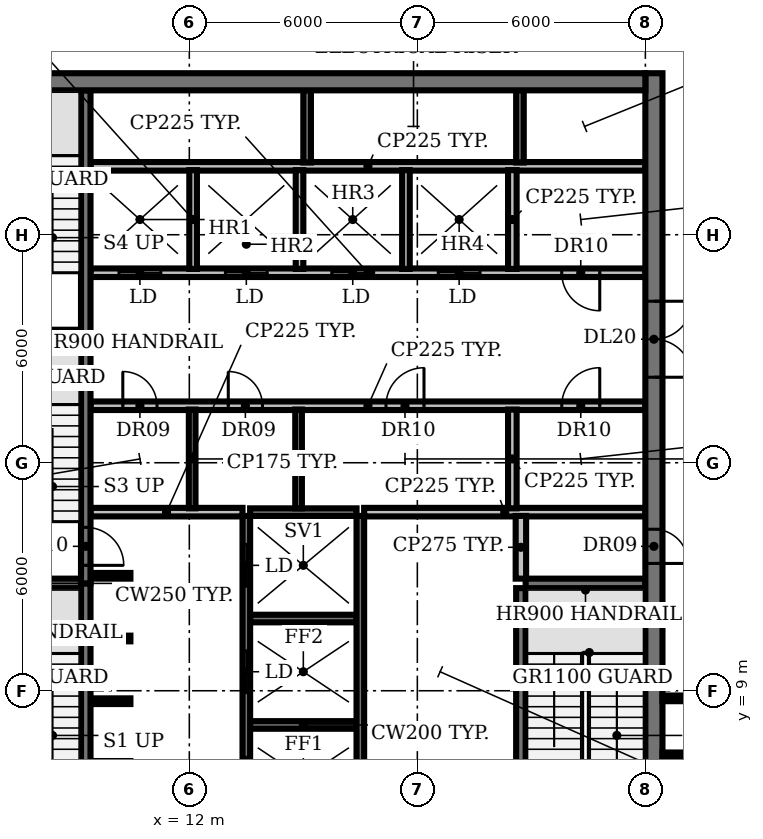
"""IFC4 building model, lengths in metres.
Left out: names, types, materials, properties, quantities, classifications, styles, units other than length and angle.
Written with IfcOpenShell. Run it as: python <this file> out.ifc"""

import sys

from ifc_helpers import new_model, si_unit, direction, frame, frame_2d, origin, place, context, subcontext, project, spatial, rectangle, extrude, element, fill, save


model = new_model("IFC4")
c1 = context("Model", 3, precision=1e-05, world=origin(), true_north=direction((0.0, 1.0)))
c2 = subcontext(c1, "Body", "Model", "MODEL_VIEW")
j1 = project(units=[si_unit("LENGTHUNIT", "METRE"), si_unit("PLANEANGLEUNIT", "RADIAN")], contexts=[c1])
p1 = place(None, origin())
s1 = spatial("IfcSite", under=j1, at=p1, CompositionType="ELEMENT")
p2 = place(p1, origin())
s2 = spatial("IfcBuilding", under=s1, at=p2, CompositionType="ELEMENT")
p3 = place(p2, frame((0.0, 0.0, 226.4)))
s3 = spatial("IfcBuildingStorey", under=s2, at=p3, CompositionType="ELEMENT", Elevation=226.4)
p4 = place(p3, frame((13.6, 8.1, 0.0), z_axis=(0.0, 0.0, 1.0), x_axis=(1.0, 0.0, 0.0)))
e1 = element("IfcWall", 1, at=p4, inside=s3, PredefinedType="SHEAR", context=c2, shape_type="SweptSolid", body=[
    extrude(rectangle(XDim=2.8, YDim=0.2, at=frame_2d((1.4, 0.0))), origin(), (0.0, 0.0, 1.0), 3.85),
])
for number, where, z_axis, x_axis in (
    (2, (9.4, 8.725, 0.0), (0.0, 0.0, 1.0), (1.0, 0.0, 0.0)),
    (3, (9.4, 10.375, 0.0), (0.0, 0.0, 1.0), (1.0, 0.0, 0.0)),
):
    element("IfcWall", number, at=place(p3, frame(where, z_axis=z_axis, x_axis=x_axis)), inside=s3, PredefinedType="SHEAR", context=c2, shape_type="SweptSolid", body=[
        extrude(rectangle(XDim=1.05, YDim=0.15, at=frame_2d((0.525, 0.0))), origin(), (0.0, 0.0, 1.0), 3.85),
    ])
p5 = place(p3, frame((13.6, 10.9, 0.0), z_axis=(0.0, 0.0, 1.0), x_axis=(1.0, 0.0, 0.0)))
e4 = element("IfcWall", 4, at=p5, inside=s3, PredefinedType="SHEAR", context=c2, shape_type="SweptSolid", body=[
    extrude(rectangle(XDim=2.8, YDim=0.2, at=frame_2d((1.4, 0.0))), origin(), (0.0, 0.0, 1.0), 3.85),
])
for number, where, z_axis, x_axis in (
    (5, (6.0, 11.825, 0.0), (0.0, 0.0, 1.0), (1.0, 0.0, 0.0)),
    (6, (20.85, 11.825, 0.0), (0.0, 0.0, 1.0), (1.0, 0.0, 0.0)),
):
    element("IfcWall", number, at=place(p3, frame(where, z_axis=z_axis, x_axis=x_axis)), inside=s3, PredefinedType="SHEAR", context=c2, shape_type="SweptSolid", body=[
        extrude(rectangle(XDim=3.15, YDim=0.25, at=frame_2d((1.575, 0.0))), origin(), (0.0, 0.0, 1.0), 3.85),
    ])
p6 = place(p3, frame((9.4, 12.025, 0.0), z_axis=(0.0, 0.0, 1.0), x_axis=(1.0, 0.0, 0.0)))
e7 = element("IfcWall", 7, at=p6, inside=s3, PredefinedType="SHEAR", context=c2, shape_type="SweptSolid", body=[
    extrude(rectangle(XDim=1.05, YDim=0.15, at=frame_2d((0.525, 0.0))), origin(), (0.0, 0.0, 1.0), 3.85),
])
p7 = place(p3, frame((9.4, 13.7, 0.0), z_axis=(0.0, 0.0, 1.0), x_axis=(1.0, 0.0, 0.0)))
e8 = element("IfcWall", 8, at=p7, inside=s3, PredefinedType="PARTITIONING", context=c2, shape_type="SweptSolid", body=[
    extrude(rectangle(XDim=4.0, YDim=0.225, at=frame_2d((2.0, 0.0))), origin(), (0.0, 0.0, 1.0), 3.85),
])
p8 = place(p3, frame((13.6, 13.7, 0.0), z_axis=(0.0, 0.0, 1.0), x_axis=(1.0, 0.0, 0.0)))
e9 = element("IfcWall", 9, at=p8, inside=s3, PredefinedType="SHEAR", context=c2, shape_type="SweptSolid", body=[
    extrude(rectangle(XDim=2.8, YDim=0.2, at=frame_2d((1.4, 0.0))), origin(), (0.0, 0.0, 1.0), 3.85),
])
p9 = place(p3, frame((16.6, 13.7, 0.0), z_axis=(0.0, 0.0, 1.0), x_axis=(1.0, 0.0, 0.0)))
e10 = element("IfcWall", 10, at=p9, inside=s3, PredefinedType="PARTITIONING", context=c2, shape_type="SweptSolid", body=[
    extrude(rectangle(XDim=7.4, YDim=0.225, at=frame_2d((3.7, 0.0))), origin(), (0.0, 0.0, 1.0), 3.85),
])
p10 = place(p3, frame((9.4, 16.5, 0.0), z_axis=(0.0, 0.0, 1.0), x_axis=(1.0, 0.0, 0.0)))
e11 = element("IfcWall", 11, at=p10, inside=s3, PredefinedType="PARTITIONING", context=c2, shape_type="SweptSolid", body=[
    extrude(rectangle(XDim=14.6, YDim=0.225, at=frame_2d((7.3, 0.0))), origin(), (0.0, 0.0, 1.0), 3.85),
])
p11 = place(p10, frame((0.85, 0.0, 0.0)))
e12 = element("IfcOpeningElement", 12, at=p11, cuts=e11, PredefinedType="OPENING", context=c2, shape_type="SweptSolid", body=[
    extrude(rectangle(XDim=0.9, YDim=2.1, at=frame_2d((0.45, 1.05))), frame((0.0, 0.123, 0.0), z_axis=(0.0, -1.0, 0.0), x_axis=(1.0, 0.0, 0.0)), (0.0, 0.0, 1.0), 0.245),
])
p12 = place(p10, frame((3.625, 0.0, 0.0)))
e13 = element("IfcOpeningElement", 13, at=p12, cuts=e11, PredefinedType="OPENING", context=c2, shape_type="SweptSolid", body=[
    extrude(rectangle(XDim=0.9, YDim=2.1, at=frame_2d((0.45, 1.05))), frame((0.0, 0.123, 0.0), z_axis=(0.0, -1.0, 0.0), x_axis=(1.0, 0.0, 0.0)), (0.0, 0.0, 1.0), 0.245),
])
p13 = place(p10, frame((7.775, 0.0, 0.0)))
e14 = element("IfcOpeningElement", 14, at=p13, cuts=e11, PredefinedType="OPENING", context=c2, shape_type="SweptSolid", body=[
    extrude(rectangle(XDim=1.0, YDim=2.1, at=frame_2d((0.5, 1.05))), frame((0.0, 0.123, 0.0), z_axis=(0.0, -1.0, 0.0), x_axis=(1.0, 0.0, 0.0)), (0.0, 0.0, 1.0), 0.245),
])
p14 = place(p10, frame((12.4, 0.0, 0.0)))
e15 = element("IfcOpeningElement", 15, at=p14, cuts=e11, PredefinedType="OPENING", context=c2, shape_type="SweptSolid", body=[
    extrude(rectangle(XDim=1.0, YDim=2.1, at=frame_2d((0.5, 1.05))), frame((0.0, 0.123, 0.0), z_axis=(0.0, -1.0, 0.0), x_axis=(1.0, 0.0, 0.0)), (0.0, 0.0, 1.0), 0.245),
])
p15 = place(p3, frame((6.0, 18.375, 0.0), z_axis=(0.0, 0.0, 1.0), x_axis=(1.0, 0.0, 0.0)))
e16 = element("IfcWall", 16, at=p15, inside=s3, PredefinedType="SHEAR", context=c2, shape_type="SweptSolid", body=[
    extrude(rectangle(XDim=3.15, YDim=0.25, at=frame_2d((1.575, 0.0))), origin(), (0.0, 0.0, 1.0), 3.85),
])
p16 = place(p3, frame((24.0, 20.0, 0.0), z_axis=(0.0, 0.0, 1.0), x_axis=(-1.0, 0.0, 0.0)))
e17 = element("IfcWall", 17, at=p16, inside=s3, PredefinedType="PARTITIONING", context=c2, shape_type="SweptSolid", body=[
    extrude(rectangle(XDim=14.6, YDim=0.225, at=frame_2d((7.3, 0.0))), origin(), (0.0, 0.0, 1.0), 3.85),
])
p17 = place(p16, frame((12.75, 0.0, 0.0)))
e18 = element("IfcOpeningElement", 18, at=p17, cuts=e17, PredefinedType="OPENING", context=c2, shape_type="SweptSolid", body=[
    extrude(rectangle(XDim=1.1, YDim=2.1, at=frame_2d((0.55, 1.05))), frame((0.0, 0.123, 0.0), z_axis=(0.0, -1.0, 0.0), x_axis=(1.0, 0.0, 0.0)), (0.0, 0.0, 1.0), 0.245),
])
p18 = place(p16, frame((9.95, 0.0, 0.0)))
e19 = element("IfcOpeningElement", 19, at=p18, cuts=e17, PredefinedType="OPENING", context=c2, shape_type="SweptSolid", body=[
    extrude(rectangle(XDim=1.1, YDim=2.1, at=frame_2d((0.55, 1.05))), frame((0.0, 0.123, 0.0), z_axis=(0.0, -1.0, 0.0), x_axis=(1.0, 0.0, 0.0)), (0.0, 0.0, 1.0), 0.245),
])
p19 = place(p16, frame((7.15, 0.0, 0.0)))
e20 = element("IfcOpeningElement", 20, at=p19, cuts=e17, PredefinedType="OPENING", context=c2, shape_type="SweptSolid", body=[
    extrude(rectangle(XDim=1.1, YDim=2.1, at=frame_2d((0.55, 1.05))), frame((0.0, 0.123, 0.0), z_axis=(0.0, -1.0, 0.0), x_axis=(1.0, 0.0, 0.0)), (0.0, 0.0, 1.0), 0.245),
])
p20 = place(p16, frame((4.35, 0.0, 0.0)))
e21 = element("IfcOpeningElement", 21, at=p20, cuts=e17, PredefinedType="OPENING", context=c2, shape_type="SweptSolid", body=[
    extrude(rectangle(XDim=1.1, YDim=2.1, at=frame_2d((0.55, 1.05))), frame((0.0, 0.123, 0.0), z_axis=(0.0, -1.0, 0.0), x_axis=(1.0, 0.0, 0.0)), (0.0, 0.0, 1.0), 0.245),
])
p21 = place(p16, frame((1.2, 0.0, 0.0)))
e22 = element("IfcOpeningElement", 22, at=p21, cuts=e17, PredefinedType="OPENING", context=c2, shape_type="SweptSolid", body=[
    extrude(rectangle(XDim=1.0, YDim=2.1, at=frame_2d((0.5, 1.05))), frame((0.0, 0.123, 0.0), z_axis=(0.0, -1.0, 0.0), x_axis=(1.0, 0.0, 0.0)), (0.0, 0.0, 1.0), 0.245),
])
p22 = place(p3, frame((9.4, 22.8, 0.0), z_axis=(0.0, 0.0, 1.0), x_axis=(1.0, 0.0, 0.0)))
e23 = element("IfcWall", 23, at=p22, inside=s3, PredefinedType="PARTITIONING", context=c2, shape_type="SweptSolid", body=[
    extrude(rectangle(XDim=14.6, YDim=0.225, at=frame_2d((7.3, 0.0))), origin(), (0.0, 0.0, 1.0), 3.85),
])
p23 = place(p3, frame((9.275, 11.825, 0.0), z_axis=(0.0, 0.0, 1.0), x_axis=(0.0, -1.0, 0.0)))
e24 = element("IfcWall", 24, at=p23, inside=s3, PredefinedType="SHEAR", context=c2, shape_type="SweptSolid", body=[
    extrude(rectangle(XDim=6.425, YDim=0.25, at=frame_2d((3.212, 0.0))), origin(), (0.0, 0.0, 1.0), 3.85),
])
p24 = place(p23, frame((5.075, 0.0, 0.0)))
e25 = element("IfcOpeningElement", 25, at=p24, cuts=e24, PredefinedType="OPENING", context=c2, shape_type="SweptSolid", body=[
    extrude(rectangle(XDim=1.0, YDim=2.1, at=frame_2d((0.5, 1.05))), frame((0.0, 0.135, 0.0), z_axis=(0.0, -1.0, 0.0), x_axis=(1.0, 0.0, 0.0)), (0.0, 0.0, 1.0), 0.27),
])
p25 = place(p3, frame((9.275, 18.375, 0.0), z_axis=(0.0, 0.0, 1.0), x_axis=(0.0, -1.0, 0.0)))
e26 = element("IfcWall", 26, at=p25, inside=s3, PredefinedType="SHEAR", context=c2, shape_type="SweptSolid", body=[
    extrude(rectangle(XDim=6.55, YDim=0.25, at=frame_2d((3.275, 0.0))), origin(), (0.0, 0.0, 1.0), 3.85),
])
p26 = place(p25, frame((5.075, 0.0, 0.0)))
e27 = element("IfcOpeningElement", 27, at=p26, cuts=e26, PredefinedType="OPENING", context=c2, shape_type="SweptSolid", body=[
    extrude(rectangle(XDim=1.0, YDim=2.1, at=frame_2d((0.5, 1.05))), frame((0.0, 0.135, 0.0), z_axis=(0.0, -1.0, 0.0), x_axis=(1.0, 0.0, 0.0)), (0.0, 0.0, 1.0), 0.27),
])
p27 = place(p3, frame((9.275, 18.375, 0.0), z_axis=(0.0, 0.0, 1.0), x_axis=(0.0, 1.0, 0.0)))
e28 = element("IfcWall", 28, at=p27, inside=s3, PredefinedType="SHEAR", context=c2, shape_type="SweptSolid", body=[
    extrude(rectangle(XDim=6.425, YDim=0.25, at=frame_2d((3.212, 0.0))), origin(), (0.0, 0.0, 1.0), 3.85),
])
p28 = place(p3, frame((12.075, 13.8, 0.0), z_axis=(0.0, 0.0, 1.0), x_axis=(0.0, 1.0, 0.0)))
e29 = element("IfcWall", 29, at=p28, inside=s3, PredefinedType="PARTITIONING", context=c2, shape_type="SweptSolid", body=[
    extrude(rectangle(XDim=2.6, YDim=0.175, at=frame_2d((1.3, 0.0))), origin(), (0.0, 0.0, 1.0), 3.85),
])
p29 = place(p3, frame((12.1, 20.1, 0.0), z_axis=(0.0, 0.0, 1.0), x_axis=(0.0, 1.0, 0.0)))
e30 = element("IfcWall", 30, at=p29, inside=s3, PredefinedType="SOLIDWALL", context=c2, shape_type="SweptSolid", body=[
    extrude(rectangle(XDim=2.6, YDim=0.2, at=frame_2d((1.3, 0.0))), origin(), (0.0, 0.0, 1.0), 3.85),
])
p30 = place(p3, frame((13.5, 5.4, 0.0), z_axis=(0.0, 0.0, 1.0), x_axis=(0.0, 1.0, 0.0)))
e31 = element("IfcWall", 31, at=p30, inside=s3, PredefinedType="SHEAR", context=c2, shape_type="SweptSolid", body=[
    extrude(rectangle(XDim=8.2, YDim=0.2, at=frame_2d((4.1, 0.0))), origin(), (0.0, 0.0, 1.0), 3.85),
])
p31 = place(p30, frame((0.75, 0.0, 0.0)))
e32 = element("IfcOpeningElement", 32, at=p31, cuts=e31, PredefinedType="OPENING", context=c2, shape_type="SweptSolid", body=[
    extrude(rectangle(XDim=1.1, YDim=2.1, at=frame_2d((0.55, 1.05))), frame((0.0, 0.11, 0.0), z_axis=(0.0, -1.0, 0.0), x_axis=(1.0, 0.0, 0.0)), (0.0, 0.0, 1.0), 0.22),
])
p32 = place(p30, frame((3.55, 0.0, 0.0)))
e33 = element("IfcOpeningElement", 33, at=p32, cuts=e31, PredefinedType="OPENING", context=c2, shape_type="SweptSolid", body=[
    extrude(rectangle(XDim=1.1, YDim=2.1, at=frame_2d((0.55, 1.05))), frame((0.0, 0.11, 0.0), z_axis=(0.0, -1.0, 0.0), x_axis=(1.0, 0.0, 0.0)), (0.0, 0.0, 1.0), 0.22),
])
p33 = place(p30, frame((6.35, 0.0, 0.0)))
e34 = element("IfcOpeningElement", 34, at=p33, cuts=e31, PredefinedType="OPENING", context=c2, shape_type="SweptSolid", body=[
    extrude(rectangle(XDim=1.1, YDim=2.1, at=frame_2d((0.55, 1.05))), frame((0.0, 0.11, 0.0), z_axis=(0.0, -1.0, 0.0), x_axis=(1.0, 0.0, 0.0)), (0.0, 0.0, 1.0), 0.22),
])
p34 = place(p3, frame((14.875, 13.8, 0.0), z_axis=(0.0, 0.0, 1.0), x_axis=(0.0, 1.0, 0.0)))
e35 = element("IfcWall", 35, at=p34, inside=s3, PredefinedType="PARTITIONING", context=c2, shape_type="SweptSolid", body=[
    extrude(rectangle(XDim=2.6, YDim=0.175, at=frame_2d((1.3, 0.0))), origin(), (0.0, 0.0, 1.0), 3.85),
])
p35 = place(p3, frame((14.9, 20.1, 0.0), z_axis=(0.0, 0.0, 1.0), x_axis=(0.0, 1.0, 0.0)))
e36 = element("IfcWall", 36, at=p35, inside=s3, PredefinedType="SOLIDWALL", context=c2, shape_type="SweptSolid", body=[
    extrude(rectangle(XDim=2.6, YDim=0.2, at=frame_2d((1.3, 0.0))), origin(), (0.0, 0.0, 1.0), 3.85),
])
p36 = place(p3, frame((15.1, 22.9, 0.0), z_axis=(0.0, 0.0, 1.0), x_axis=(0.0, 1.0, 0.0)))
e37 = element("IfcWall", 37, at=p36, inside=s3, PredefinedType="SHEAR", context=c2, shape_type="SweptSolid", body=[
    extrude(rectangle(XDim=1.9, YDim=0.2, at=frame_2d((0.95, 0.0))), origin(), (0.0, 0.0, 1.0), 3.85),
])
p37 = place(p3, frame((16.5, 5.4, 0.0), z_axis=(0.0, 0.0, 1.0), x_axis=(0.0, 1.0, 0.0)))
e38 = element("IfcWall", 38, at=p37, inside=s3, PredefinedType="SHEAR", context=c2, shape_type="SweptSolid", body=[
    extrude(rectangle(XDim=8.2, YDim=0.2, at=frame_2d((4.1, 0.0))), origin(), (0.0, 0.0, 1.0), 3.85),
])
p38 = place(p3, frame((17.7, 20.1, 0.0), z_axis=(0.0, 0.0, 1.0), x_axis=(0.0, 1.0, 0.0)))
e39 = element("IfcWall", 39, at=p38, inside=s3, PredefinedType="SOLIDWALL", context=c2, shape_type="SweptSolid", body=[
    extrude(rectangle(XDim=2.6, YDim=0.2, at=frame_2d((1.3, 0.0))), origin(), (0.0, 0.0, 1.0), 3.85),
])
for number, where, z_axis, x_axis in (
    (40, (20.5, 13.8, 0.0), (0.0, 0.0, 1.0), (0.0, 1.0, 0.0)),
    (41, (20.5, 20.1, 0.0), (0.0, 0.0, 1.0), (0.0, 1.0, 0.0)),
):
    element("IfcWall", number, at=place(p3, frame(where, z_axis=z_axis, x_axis=x_axis)), inside=s3, PredefinedType="PARTITIONING", context=c2, shape_type="SweptSolid", body=[
        extrude(rectangle(XDim=2.6, YDim=0.225, at=frame_2d((1.3, 0.0))), origin(), (0.0, 0.0, 1.0), 3.85),
    ])
p39 = place(p3, frame((20.7, 22.9, 0.0), z_axis=(0.0, 0.0, 1.0), x_axis=(0.0, 1.0, 0.0)))
e42 = element("IfcWall", 42, at=p39, inside=s3, PredefinedType="SHEAR", context=c2, shape_type="SweptSolid", body=[
    extrude(rectangle(XDim=1.9, YDim=0.2, at=frame_2d((0.95, 0.0))), origin(), (0.0, 0.0, 1.0), 3.85),
])
p40 = place(p3, frame((20.725, 5.4, 0.0), z_axis=(0.0, 0.0, 1.0), x_axis=(0.0, 1.0, 0.0)))
e43 = element("IfcWall", 43, at=p40, inside=s3, PredefinedType="SHEAR", context=c2, shape_type="SweptSolid", body=[
    extrude(rectangle(XDim=6.3, YDim=0.25, at=frame_2d((3.15, 0.0))), origin(), (0.0, 0.0, 1.0), 3.85),
])
p41 = place(p3, frame((20.725, 11.95, 0.0), z_axis=(0.0, 0.0, 1.0), x_axis=(0.0, 1.0, 0.0)))
e44 = element("IfcWall", 44, at=p41, inside=s3, PredefinedType="PARTITIONING", context=c2, shape_type="SweptSolid", body=[
    extrude(rectangle(XDim=1.65, YDim=0.275, at=frame_2d((0.825, 0.0))), origin(), (0.0, 0.0, 1.0), 3.85),
])
p42 = place(p3, frame((24.225, 25.25, 0.0), z_axis=(0.0, 0.0, 1.0), x_axis=(0.0, -1.0, 0.0)))
e45 = element("IfcWall", 45, at=p42, inside=s3, PredefinedType="SHEAR", context=c2, shape_type="SweptSolid", body=[
    extrude(rectangle(XDim=20.83, YDim=0.45, at=frame_2d((10.415, 0.0))), origin(), (0.0, 0.0, 1.0), 3.85),
])
p43 = place(p42, frame((18.1, 0.0, 0.0)))
e46 = element("IfcOpeningElement", 46, at=p43, cuts=e45, PredefinedType="OPENING", context=c2, shape_type="SweptSolid", body=[
    extrude(rectangle(XDim=1.5, YDim=2.1, at=frame_2d((0.75, 1.05))), frame((0.0, 0.235, 0.0), z_axis=(0.0, -1.0, 0.0), x_axis=(1.0, 0.0, 0.0)), (0.0, 0.0, 1.0), 0.47),
])
p44 = place(p42, frame((12.0, 0.0, 0.0)))
e47 = element("IfcOpeningElement", 47, at=p44, cuts=e45, PredefinedType="OPENING", context=c2, shape_type="SweptSolid", body=[
    extrude(rectangle(XDim=0.9, YDim=2.1, at=frame_2d((0.45, 1.05))), frame((0.0, 0.235, 0.0), z_axis=(0.0, -1.0, 0.0), x_axis=(1.0, 0.0, 0.0)), (0.0, 0.0, 1.0), 0.47),
])
p45 = place(p42, frame((6.0, 0.0, 0.0)))
e48 = element("IfcOpeningElement", 48, at=p45, cuts=e45, PredefinedType="OPENING", context=c2, shape_type="SweptSolid", body=[
    extrude(rectangle(XDim=2.0, YDim=2.1, at=frame_2d((1.0, 1.05))), frame((0.0, 0.235, 0.0), z_axis=(0.0, -1.0, 0.0), x_axis=(1.0, 0.0, 0.0)), (0.0, 0.0, 1.0), 0.47),
])
p46 = place(p3, frame((6.0, 25.025, 0.0), z_axis=(0.0, 0.0, 1.0), x_axis=(1.0, 0.0, 0.0)))
e49 = element("IfcWall", 49, at=p46, inside=s3, PredefinedType="SHEAR", context=c2, shape_type="SweptSolid", body=[
    extrude(rectangle(XDim=18.0, YDim=0.45, at=frame_2d((9.0, 0.0))), origin(), (0.0, 0.0, 1.0), 3.85),
])
for number, where, z_axis, x_axis in (
    (50, (24.45, 7.3, 0.0), (0.0, 0.0, 1.0), (1.0, 0.0, 0.0)),
    (51, (24.45, 8.8, 0.0), (0.0, 0.0, 1.0), (1.0, 0.0, 0.0)),
):
    element("IfcWall", number, at=place(p3, frame(where, z_axis=z_axis, x_axis=x_axis)), inside=s3, PredefinedType="PARTITIONING", context=c2, shape_type="SweptSolid", body=[
        extrude(rectangle(XDim=1.05, YDim=0.15, at=frame_2d((0.525, 0.0))), origin(), (0.0, 0.0, 1.0), 2.88),
    ])
p47 = place(p11, origin())
e52 = element("IfcDoor", 52, at=p47, inside=s3, OperationType="SINGLE_SWING_LEFT", PredefinedType="DOOR", context=c2, shape_type="SweptSolid", body=[
    extrude(rectangle(XDim=0.9, YDim=2.1, at=frame_2d((0.45, 1.05))), frame((0.0, 0.025, 0.0), z_axis=(0.0, -1.0, 0.0), x_axis=(1.0, 0.0, 0.0)), (0.0, 0.0, 1.0), 0.05),
])
fill(e12, e52)
p48 = place(p12, origin())
e53 = element("IfcDoor", 53, at=p48, inside=s3, OperationType="SINGLE_SWING_LEFT", PredefinedType="DOOR", context=c2, shape_type="SweptSolid", body=[
    extrude(rectangle(XDim=0.9, YDim=2.1, at=frame_2d((0.45, 1.05))), frame((0.0, 0.025, 0.0), z_axis=(0.0, -1.0, 0.0), x_axis=(1.0, 0.0, 0.0)), (0.0, 0.0, 1.0), 0.05),
])
fill(e13, e53)
p49 = place(p13, origin())
e54 = element("IfcDoor", 54, at=p49, inside=s3, OperationType="SINGLE_SWING_RIGHT", PredefinedType="DOOR", context=c2, shape_type="SweptSolid", body=[
    extrude(rectangle(XDim=1.0, YDim=2.1, at=frame_2d((0.5, 1.05))), frame((0.0, 0.025, 0.0), z_axis=(0.0, -1.0, 0.0), x_axis=(1.0, 0.0, 0.0)), (0.0, 0.0, 1.0), 0.05),
])
fill(e14, e54)
p50 = place(p14, origin())
e55 = element("IfcDoor", 55, at=p50, inside=s3, OperationType="SINGLE_SWING_RIGHT", PredefinedType="DOOR", context=c2, shape_type="SweptSolid", body=[
    extrude(rectangle(XDim=1.0, YDim=2.1, at=frame_2d((0.5, 1.05))), frame((0.0, 0.025, 0.0), z_axis=(0.0, -1.0, 0.0), x_axis=(1.0, 0.0, 0.0)), (0.0, 0.0, 1.0), 0.05),
])
fill(e15, e55)
p51 = place(p17, origin())
e56 = element("IfcDoor", 56, at=p51, inside=s3, OperationType="DOUBLE_DOOR_SLIDING", PredefinedType="DOOR", context=c2, shape_type="SweptSolid", body=[
    extrude(rectangle(XDim=1.1, YDim=2.1, at=frame_2d((0.55, 1.05))), frame((0.0, 0.025, 0.0), z_axis=(0.0, -1.0, 0.0), x_axis=(1.0, 0.0, 0.0)), (0.0, 0.0, 1.0), 0.05),
])
fill(e18, e56)
p52 = place(p18, origin())
e57 = element("IfcDoor", 57, at=p52, inside=s3, OperationType="DOUBLE_DOOR_SLIDING", PredefinedType="DOOR", context=c2, shape_type="SweptSolid", body=[
    extrude(rectangle(XDim=1.1, YDim=2.1, at=frame_2d((0.55, 1.05))), frame((0.0, 0.025, 0.0), z_axis=(0.0, -1.0, 0.0), x_axis=(1.0, 0.0, 0.0)), (0.0, 0.0, 1.0), 0.05),
])
fill(e19, e57)
p53 = place(p19, origin())
e58 = element("IfcDoor", 58, at=p53, inside=s3, OperationType="DOUBLE_DOOR_SLIDING", PredefinedType="DOOR", context=c2, shape_type="SweptSolid", body=[
    extrude(rectangle(XDim=1.1, YDim=2.1, at=frame_2d((0.55, 1.05))), frame((0.0, 0.025, 0.0), z_axis=(0.0, -1.0, 0.0), x_axis=(1.0, 0.0, 0.0)), (0.0, 0.0, 1.0), 0.05),
])
fill(e20, e58)
p54 = place(p20, origin())
e59 = element("IfcDoor", 59, at=p54, inside=s3, OperationType="DOUBLE_DOOR_SLIDING", PredefinedType="DOOR", context=c2, shape_type="SweptSolid", body=[
    extrude(rectangle(XDim=1.1, YDim=2.1, at=frame_2d((0.55, 1.05))), frame((0.0, 0.025, 0.0), z_axis=(0.0, -1.0, 0.0), x_axis=(1.0, 0.0, 0.0)), (0.0, 0.0, 1.0), 0.05),
])
fill(e21, e59)
p55 = place(p21, origin())
e60 = element("IfcDoor", 60, at=p55, inside=s3, OperationType="SINGLE_SWING_LEFT", PredefinedType="DOOR", context=c2, shape_type="SweptSolid", body=[
    extrude(rectangle(XDim=1.0, YDim=2.1, at=frame_2d((0.5, 1.05))), frame((0.0, 0.025, 0.0), z_axis=(0.0, -1.0, 0.0), x_axis=(1.0, 0.0, 0.0)), (0.0, 0.0, 1.0), 0.05),
])
fill(e22, e60)
p56 = place(p26, origin())
e61 = element("IfcDoor", 61, at=p56, inside=s3, OperationType="SINGLE_SWING_RIGHT", PredefinedType="DOOR", context=c2, shape_type="SweptSolid", body=[
    extrude(rectangle(XDim=1.0, YDim=2.1, at=frame_2d((0.5, 1.05))), frame((0.0, 0.025, 0.0), z_axis=(0.0, -1.0, 0.0), x_axis=(1.0, 0.0, 0.0)), (0.0, 0.0, 1.0), 0.05),
])
fill(e27, e61)
p57 = place(p31, origin())
e62 = element("IfcDoor", 62, at=p57, inside=s3, OperationType="DOUBLE_DOOR_SLIDING", PredefinedType="DOOR", context=c2, shape_type="SweptSolid", body=[
    extrude(rectangle(XDim=1.1, YDim=2.1, at=frame_2d((0.55, 1.05))), frame((0.0, 0.025, 0.0), z_axis=(0.0, -1.0, 0.0), x_axis=(1.0, 0.0, 0.0)), (0.0, 0.0, 1.0), 0.05),
])
fill(e32, e62)
p58 = place(p32, origin())
e63 = element("IfcDoor", 63, at=p58, inside=s3, OperationType="DOUBLE_DOOR_SLIDING", PredefinedType="DOOR", context=c2, shape_type="SweptSolid", body=[
    extrude(rectangle(XDim=1.1, YDim=2.1, at=frame_2d((0.55, 1.05))), frame((0.0, 0.025, 0.0), z_axis=(0.0, -1.0, 0.0), x_axis=(1.0, 0.0, 0.0)), (0.0, 0.0, 1.0), 0.05),
])
fill(e33, e63)
p59 = place(p33, origin())
e64 = element("IfcDoor", 64, at=p59, inside=s3, OperationType="DOUBLE_DOOR_SLIDING", PredefinedType="DOOR", context=c2, shape_type="SweptSolid", body=[
    extrude(rectangle(XDim=1.1, YDim=2.1, at=frame_2d((0.55, 1.05))), frame((0.0, 0.025, 0.0), z_axis=(0.0, -1.0, 0.0), x_axis=(1.0, 0.0, 0.0)), (0.0, 0.0, 1.0), 0.05),
])
fill(e34, e64)
p60 = place(p44, origin())
e65 = element("IfcDoor", 65, at=p60, inside=s3, OperationType="SINGLE_SWING_RIGHT", PredefinedType="DOOR", context=c2, shape_type="SweptSolid", body=[
    extrude(rectangle(XDim=0.9, YDim=2.1, at=frame_2d((0.45, 1.05))), frame((0.0, 0.025, 0.0), z_axis=(0.0, -1.0, 0.0), x_axis=(1.0, 0.0, 0.0)), (0.0, 0.0, 1.0), 0.05),
])
fill(e47, e65)
p61 = place(p45, origin())
e66 = element("IfcDoor", 66, at=p61, inside=s3, OperationType="DOUBLE_DOOR_SINGLE_SWING", PredefinedType="DOOR", context=c2, shape_type="SweptSolid", body=[
    extrude(rectangle(XDim=2.0, YDim=2.1, at=frame_2d((1.0, 1.05))), frame((0.0, 0.025, 0.0), z_axis=(0.0, -1.0, 0.0), x_axis=(1.0, 0.0, 0.0)), (0.0, 0.0, 1.0), 0.05),
])
fill(e48, e66)
save(model, sys.argv[1])
